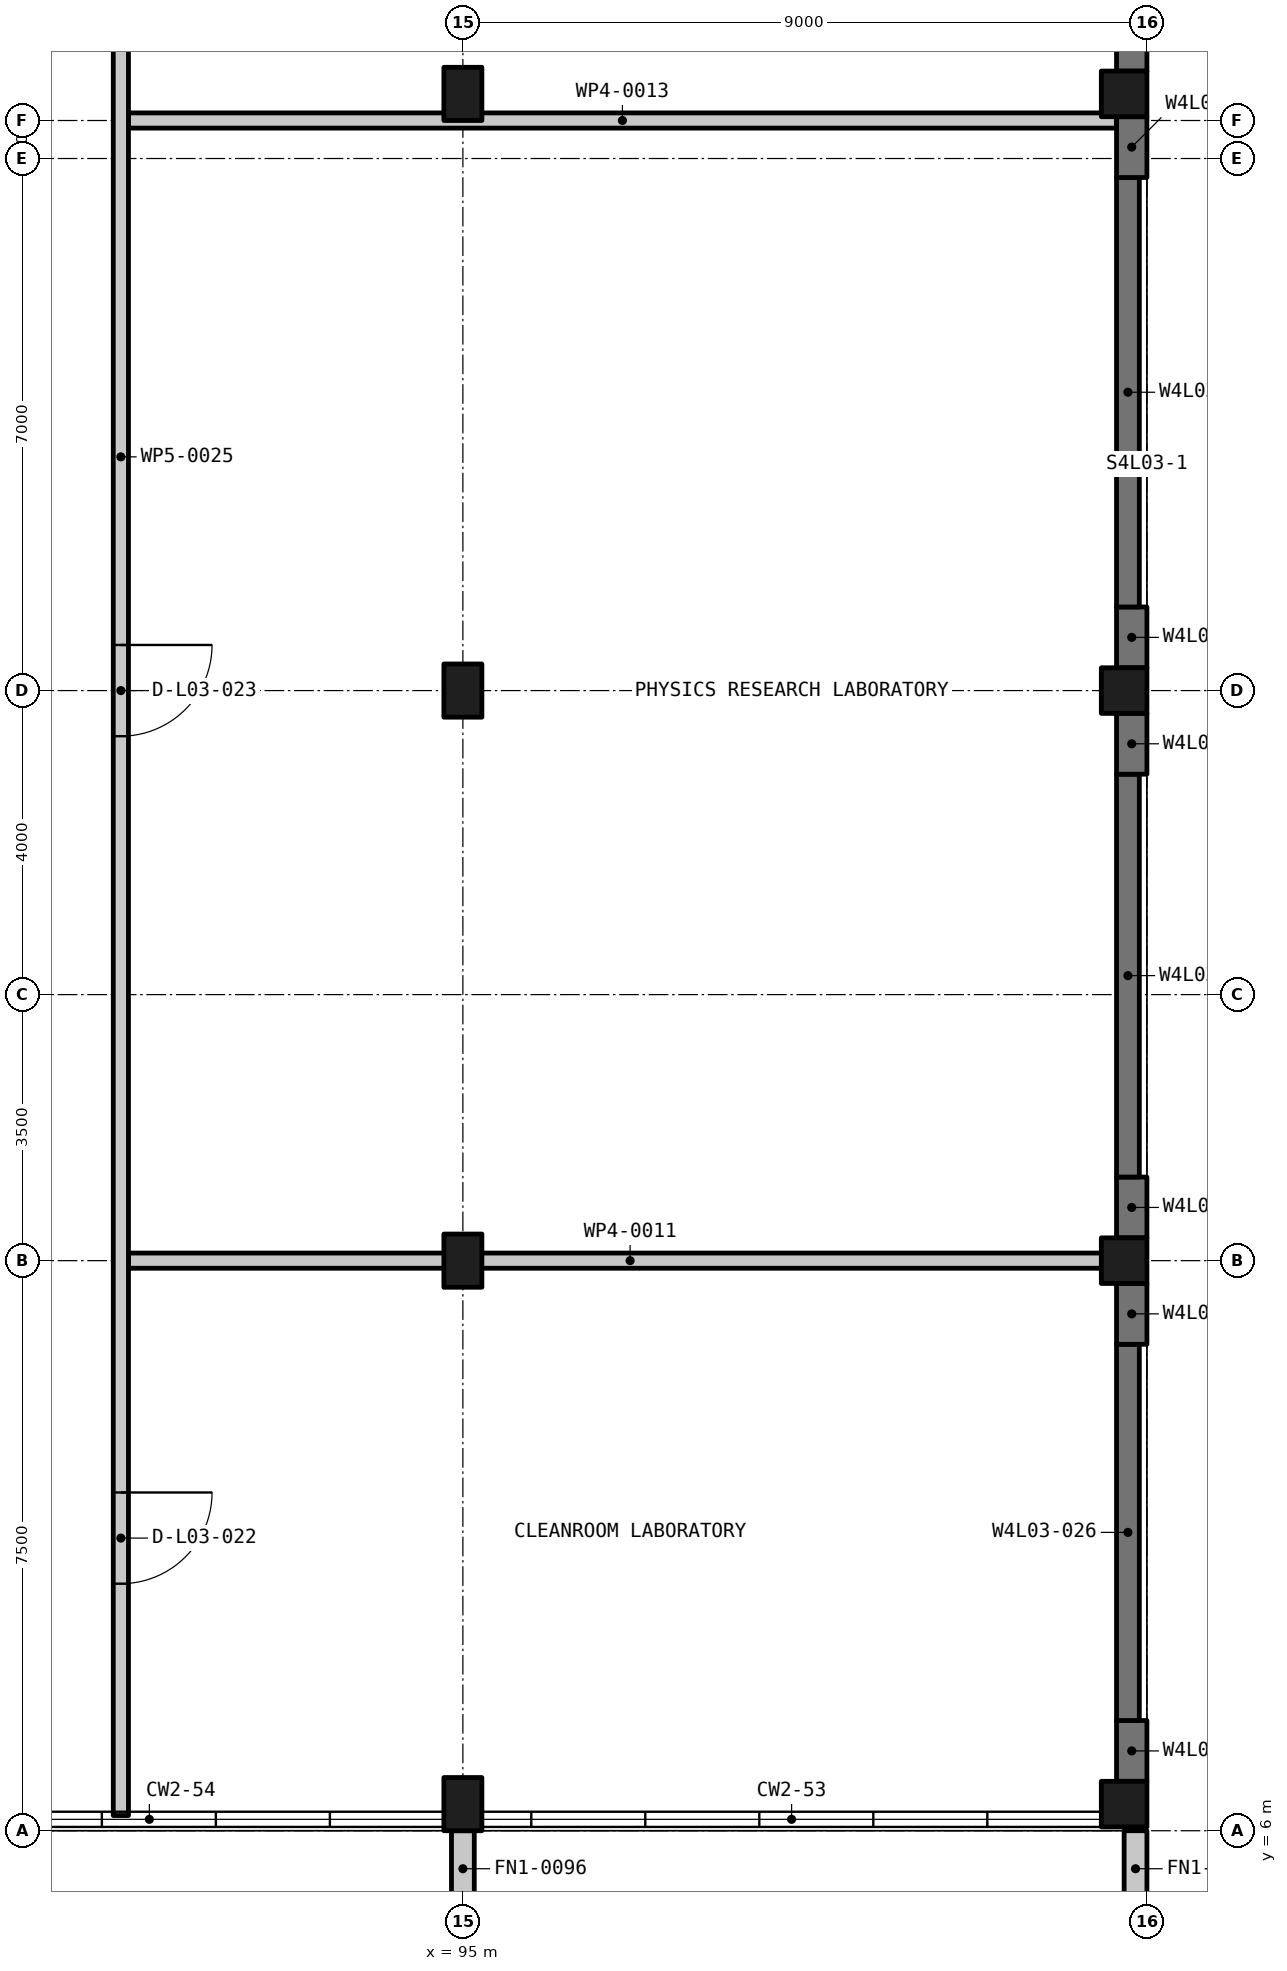
"""IFC4 building model, lengths in metres.
Left out: names, types, materials, properties, quantities, classifications, styles, units other than length and angle.
Written with IfcOpenShell. Run it as: python <this file> out.ifc"""

import sys

from ifc_helpers import new_model, si_unit, direction, frame, frame_2d, origin, origin_2d, place, context, subcontext, project, spatial, rectangle, extrude, element, fill, save


model = new_model("IFC4")
c1 = context("Model", 3, precision=1e-05, world=origin(), true_north=direction((0.0, 1.0)))
c2 = subcontext(c1, "Body", "Model", "MODEL_VIEW")
j1 = project(units=[si_unit("LENGTHUNIT", "METRE"), si_unit("PLANEANGLEUNIT", "RADIAN")], contexts=[c1])
p1 = place(None, origin())
s1 = spatial("IfcSite", under=j1, at=p1, CompositionType="ELEMENT")
p2 = place(p1, origin())
s2 = spatial("IfcBuilding", under=s1, at=p2, CompositionType="ELEMENT")
p3 = place(p2, frame((0.0, 0.0, 15.75)))
s3 = spatial("IfcBuildingStorey", under=s2, at=p3, CompositionType="ELEMENT", Elevation=15.75)
for number, where, z_axis, x_axis in (
    (1, (95.0, 6.35, -0.3), (0.0, 0.0, 1.0), (1.0, 0.0, 0.0)),
    (2, (95.0, 13.5, -0.3), (0.0, 0.0, 1.0), (1.0, 0.0, 0.0)),
    (3, (95.0, 21.0, -0.3), (0.0, 0.0, 1.0), (1.0, 0.0, 0.0)),
    (4, (95.0, 28.85, -0.3), (0.0, 0.0, 1.0), (1.0, 0.0, 0.0)),
):
    element("IfcColumn", number, at=place(p3, frame(where, z_axis=z_axis, x_axis=x_axis)), inside=s3, PredefinedType="COLUMN", context=c2, shape_type="SweptSolid", body=[
        extrude(rectangle(XDim=0.5, YDim=0.7, at=origin_2d()), origin(), (0.0, 0.0, 1.0), 4.5),
    ])
for number, where, z_axis, x_axis in (
    (5, (103.7, 6.35, -0.3), (0.0, 0.0, 1.0), (1.0, 0.0, 0.0)),
    (6, (103.7, 13.5, -0.3), (0.0, 0.0, 1.0), (1.0, 0.0, 0.0)),
    (7, (103.7, 21.0, -0.3), (0.0, 0.0, 1.0), (1.0, 0.0, 0.0)),
    (8, (103.7, 28.85, -0.3), (0.0, 0.0, 1.0), (1.0, 0.0, 0.0)),
):
    element("IfcColumn", number, at=place(p3, frame(where, z_axis=z_axis, x_axis=x_axis)), inside=s3, PredefinedType="COLUMN", context=c2, shape_type="SweptSolid", body=[
        extrude(rectangle(XDim=0.6, YDim=0.6, at=origin_2d()), origin(), (0.0, 0.0, 1.0), 4.5),
    ])
p4 = place(p3, frame((103.8, 6.65, -0.3), z_axis=(0.0, 0.0, 1.0), x_axis=(0.0, 1.0, 0.0)))
e9 = element("IfcWall", 9, at=p4, inside=s3, PredefinedType="SOLIDWALL", context=c2, shape_type="SweptSolid", body=[
    extrude(rectangle(XDim=0.8, YDim=0.4, at=frame_2d((0.4, 0.0))), origin(), (0.0, 0.0, 1.0), 4.5),
])
p5 = place(p3, frame((103.75, 7.45, -0.3), z_axis=(0.0, 0.0, 1.0), x_axis=(0.0, 1.0, 0.0)))
e10 = element("IfcWall", 10, at=p5, inside=s3, PredefinedType="SOLIDWALL", context=c2, shape_type="SweptSolid", body=[
    extrude(rectangle(XDim=4.95, YDim=0.3, at=frame_2d((2.475, 0.0))), origin(), (0.0, 0.0, 1.0), 4.5),
])
for number, where, z_axis, x_axis in (
    (11, (103.8, 12.4, -0.3), (0.0, 0.0, 1.0), (0.0, 1.0, 0.0)),
    (12, (103.8, 13.8, -0.3), (0.0, 0.0, 1.0), (0.0, 1.0, 0.0)),
):
    element("IfcWall", number, at=place(p3, frame(where, z_axis=z_axis, x_axis=x_axis)), inside=s3, PredefinedType="SOLIDWALL", context=c2, shape_type="SweptSolid", body=[
        extrude(rectangle(XDim=0.8, YDim=0.4, at=frame_2d((0.4, 0.0))), origin(), (0.0, 0.0, 1.0), 4.5),
    ])
p6 = place(p3, frame((103.75, 14.6, -0.3), z_axis=(0.0, 0.0, 1.0), x_axis=(0.0, 1.0, 0.0)))
e13 = element("IfcWall", 13, at=p6, inside=s3, PredefinedType="SOLIDWALL", context=c2, shape_type="SweptSolid", body=[
    extrude(rectangle(XDim=5.3, YDim=0.3, at=frame_2d((2.65, 0.0))), origin(), (0.0, 0.0, 1.0), 4.5),
])
for number, where, z_axis, x_axis in (
    (14, (103.8, 19.9, -0.3), (0.0, 0.0, 1.0), (0.0, 1.0, 0.0)),
    (15, (103.8, 21.3, -0.3), (0.0, 0.0, 1.0), (0.0, 1.0, 0.0)),
):
    element("IfcWall", number, at=place(p3, frame(where, z_axis=z_axis, x_axis=x_axis)), inside=s3, PredefinedType="SOLIDWALL", context=c2, shape_type="SweptSolid", body=[
        extrude(rectangle(XDim=0.8, YDim=0.4, at=frame_2d((0.4, 0.0))), origin(), (0.0, 0.0, 1.0), 4.5),
    ])
p7 = place(p3, frame((103.75, 22.1, -0.3), z_axis=(0.0, 0.0, 1.0), x_axis=(0.0, 1.0, 0.0)))
e16 = element("IfcWall", 16, at=p7, inside=s3, PredefinedType="SOLIDWALL", context=c2, shape_type="SweptSolid", body=[
    extrude(rectangle(XDim=5.65, YDim=0.3, at=frame_2d((2.825, 0.0))), origin(), (0.0, 0.0, 1.0), 4.5),
])
for number, where, z_axis, x_axis in (
    (17, (103.8, 27.75, -0.3), (0.0, 0.0, 1.0), (0.0, 1.0, 0.0)),
    (18, (103.8, 29.15, -0.3), (0.0, 0.0, 1.0), (0.0, 1.0, 0.0)),
):
    element("IfcWall", number, at=place(p3, frame(where, z_axis=z_axis, x_axis=x_axis)), inside=s3, PredefinedType="SOLIDWALL", context=c2, shape_type="SweptSolid", body=[
        extrude(rectangle(XDim=0.8, YDim=0.4, at=frame_2d((0.4, 0.0))), origin(), (0.0, 0.0, 1.0), 4.5),
    ])
for number, where, z_axis, x_axis in (
    (19, (95.0, 6.0, 0.0), (0.0, 0.0, 1.0), (0.0, -1.0, 0.0)),
    (20, (103.85, 6.0, 0.0), (0.0, 0.0, 1.0), (0.0, -1.0, 0.0)),
):
    element("IfcWall", number, at=place(p3, frame(where, z_axis=z_axis, x_axis=x_axis)), inside=s3, PredefinedType="SOLIDWALL", context=c2, shape_type="SweptSolid", body=[
        extrude(rectangle(XDim=1.0, YDim=0.3, at=frame_2d((0.5, 0.0))), origin(), (0.0, 0.0, 1.0), 4.5),
    ])
p8 = place(p3, frame((90.6, 13.5, 0.0), z_axis=(0.0, 0.0, 1.0), x_axis=(1.0, 0.0, 0.0)))
e21 = element("IfcWall", 21, at=p8, inside=s3, PredefinedType="PARTITIONING", context=c2, shape_type="SweptSolid", body=[
    extrude(rectangle(XDim=13.2, YDim=0.2, at=frame_2d((6.6, 0.0))), origin(), (0.0, 0.0, 1.0), 3.4),
])
p9 = place(p3, frame((90.6, 28.5, 0.0), z_axis=(0.0, 0.0, 1.0), x_axis=(1.0, 0.0, 0.0)))
e22 = element("IfcWall", 22, at=p9, inside=s3, PredefinedType="PARTITIONING", context=c2, shape_type="SweptSolid", body=[
    extrude(rectangle(XDim=12.998, YDim=0.2, at=frame_2d((6.499, 0.0))), origin(), (0.0, 0.0, 1.0), 3.4),
])
p10 = place(p3, frame((90.5, 80.8, 0.0), z_axis=(0.0, 0.0, 1.0), x_axis=(0.0, -1.0, 0.0)))
e23 = element("IfcWall", 23, at=p10, inside=s3, PredefinedType="PARTITIONING", context=c2, shape_type="SweptSolid", body=[
    extrude(rectangle(XDim=74.6, YDim=0.2, at=frame_2d((37.3, 0.0))), origin(), (0.0, 0.0, 1.0), 3.3),
])
p11 = place(p10, frame((70.35, 0.0, 0.0)))
e24 = element("IfcOpeningElement", 24, at=p11, cuts=e23, PredefinedType="OPENING", context=c2, shape_type="SweptSolid", body=[
    extrude(rectangle(XDim=1.2, YDim=2.1, at=frame_2d((0.6, 1.05))), frame((0.0, 0.11, 0.0), z_axis=(0.0, -1.0, 0.0), x_axis=(1.0, 0.0, 0.0)), (0.0, 0.0, 1.0), 0.22),
])
p12 = place(p10, frame((59.2, 0.0, 0.0)))
e25 = element("IfcOpeningElement", 25, at=p12, cuts=e23, PredefinedType="OPENING", context=c2, shape_type="SweptSolid", body=[
    extrude(rectangle(XDim=1.2, YDim=2.1, at=frame_2d((0.6, 1.05))), frame((0.0, 0.11, 0.0), z_axis=(0.0, -1.0, 0.0), x_axis=(1.0, 0.0, 0.0)), (0.0, 0.0, 1.0), 0.22),
])
p13 = place(p10, frame((44.2, 0.0, 0.0)))
e26 = element("IfcOpeningElement", 26, at=p13, cuts=e23, PredefinedType="OPENING", context=c2, shape_type="SweptSolid", body=[
    extrude(rectangle(XDim=1.2, YDim=2.1, at=frame_2d((0.6, 1.05))), frame((0.0, 0.11, 0.0), z_axis=(0.0, -1.0, 0.0), x_axis=(1.0, 0.0, 0.0)), (0.0, 0.0, 1.0), 0.22),
])
p14 = place(p10, frame((35.199, 0.0, 0.0)))
e27 = element("IfcOpeningElement", 27, at=p14, cuts=e23, PredefinedType="OPENING", context=c2, shape_type="SweptSolid", body=[
    extrude(rectangle(XDim=1.2, YDim=2.1, at=frame_2d((0.6, 1.05))), frame((0.0, 0.11, 0.0), z_axis=(0.0, -1.0, 0.0), x_axis=(1.0, 0.0, 0.0)), (0.0, 0.0, 1.0), 0.22),
])
p15 = place(p10, frame((14.2, 0.0, 0.0)))
e28 = element("IfcOpeningElement", 28, at=p15, cuts=e23, PredefinedType="OPENING", context=c2, shape_type="SweptSolid", body=[
    extrude(rectangle(XDim=1.2, YDim=2.1, at=frame_2d((0.6, 1.05))), frame((0.0, 0.11, 0.0), z_axis=(0.0, -1.0, 0.0), x_axis=(1.0, 0.0, 0.0)), (0.0, 0.0, 1.0), 0.22),
])
p16 = place(p10, frame((3.075, 0.0, 0.0)))
e29 = element("IfcOpeningElement", 29, at=p16, cuts=e23, PredefinedType="OPENING", context=c2, shape_type="SweptSolid", body=[
    extrude(rectangle(XDim=1.2, YDim=2.1, at=frame_2d((0.6, 1.05))), frame((0.0, 0.11, 0.0), z_axis=(0.0, -1.0, 0.0), x_axis=(1.0, 0.0, 0.0)), (0.0, 0.0, 1.0), 0.22),
])
p17 = place(p11, origin())
e30 = element("IfcDoor", 30, at=p17, inside=s3, OperationType="SINGLE_SWING_LEFT", PredefinedType="DOOR", context=c2, shape_type="SweptSolid", body=[
    extrude(rectangle(XDim=1.2, YDim=2.1, at=frame_2d((0.6, 1.05))), frame((0.0, 0.025, 0.0), z_axis=(0.0, -1.0, 0.0), x_axis=(1.0, 0.0, 0.0)), (0.0, 0.0, 1.0), 0.05),
])
fill(e24, e30)
p18 = place(p12, origin())
e31 = element("IfcDoor", 31, at=p18, inside=s3, OperationType="SINGLE_SWING_LEFT", PredefinedType="DOOR", context=c2, shape_type="SweptSolid", body=[
    extrude(rectangle(XDim=1.2, YDim=2.1, at=frame_2d((0.6, 1.05))), frame((0.0, 0.025, 0.0), z_axis=(0.0, -1.0, 0.0), x_axis=(1.0, 0.0, 0.0)), (0.0, 0.0, 1.0), 0.05),
])
fill(e25, e31)
save(model, sys.argv[1])
